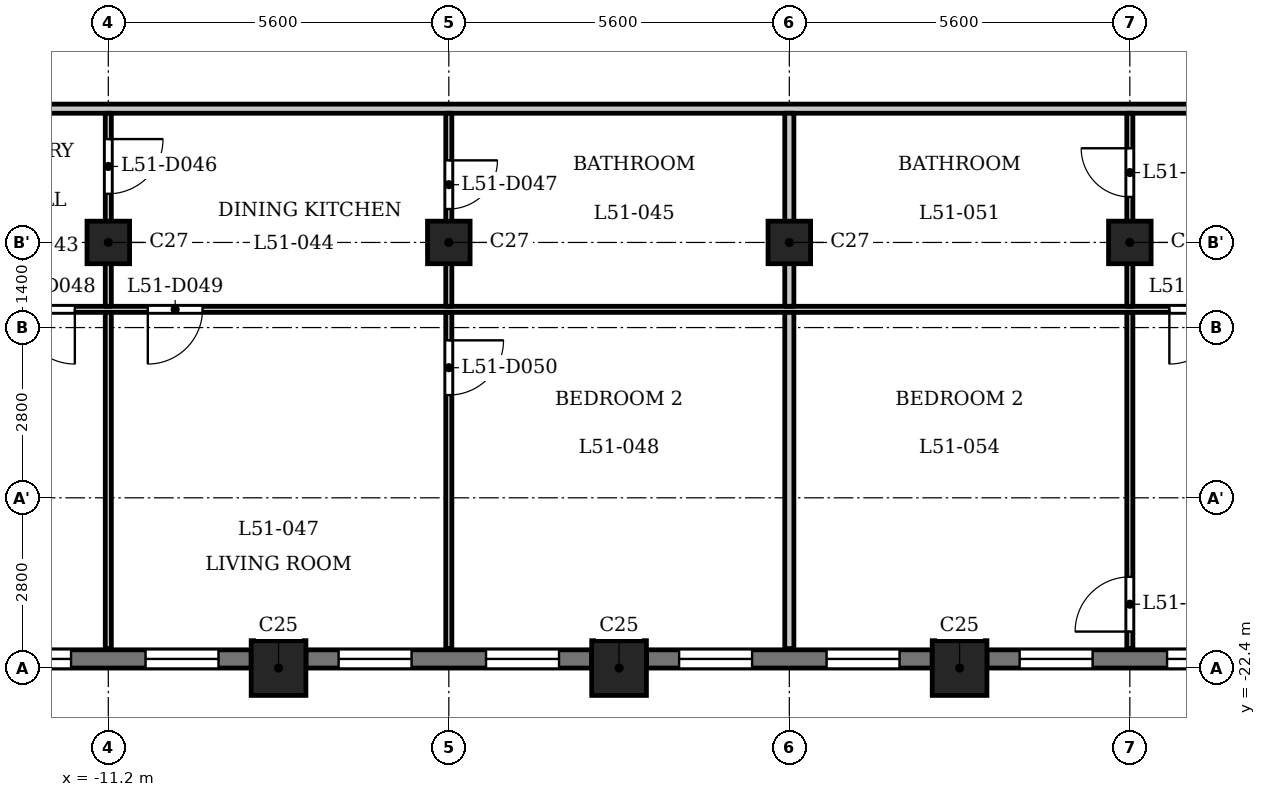
"""IFC4 building model, lengths in metres.
Left out: names, types, materials, properties, quantities, classifications, styles, units other than length and angle.
Written with IfcOpenShell. Run it as: python <this file> out.ifc"""

import sys

from ifc_helpers import new_model, si_unit, direction, frame, frame_2d, origin, origin_2d, place, context, subcontext, project, spatial, rectangle, extrude, element, fill, save


model = new_model("IFC4")
c1 = context("Model", 3, precision=1e-05, world=origin(), true_north=direction((0.0, 1.0)))
c2 = subcontext(c1, "Body", "Model", "MODEL_VIEW")
j1 = project(units=[si_unit("LENGTHUNIT", "METRE"), si_unit("PLANEANGLEUNIT", "RADIAN")], contexts=[c1])
p1 = place(None, origin())
s1 = spatial("IfcSite", under=j1, at=p1, CompositionType="ELEMENT")
p2 = place(p1, origin())
s2 = spatial("IfcBuilding", under=s1, at=p2, CompositionType="ELEMENT")
p3 = place(p2, frame((0.0, 0.0, 199.4)))
s3 = spatial("IfcBuildingStorey", under=s2, at=p3, CompositionType="ELEMENT", Elevation=199.4)
for number, where, z_axis, x_axis in (
    (1, (-8.4, -22.4, 0.0), (0.0, 0.0, 1.0), (1.0, 0.0, 0.0)),
    (2, (-2.8, -22.4, 0.0), (0.0, 0.0, 1.0), (1.0, 0.0, 0.0)),
    (3, (2.8, -22.4, 0.0), (0.0, 0.0, 1.0), (1.0, 0.0, 0.0)),
):
    element("IfcColumn", number, at=place(p3, frame(where, z_axis=z_axis, x_axis=x_axis)), inside=s3, PredefinedType="COLUMN", context=c2, shape_type="SweptSolid", body=[
        extrude(rectangle(XDim=0.9, YDim=0.9, at=origin_2d()), origin(), (0.0, 0.0, 1.0), 3.5),
    ])
for number, where, z_axis, x_axis in (
    (4, (-11.2, -15.4, 0.0), (0.0, 0.0, 1.0), (1.0, 0.0, 0.0)),
    (5, (-5.6, -15.4, 0.0), (0.0, 0.0, 1.0), (1.0, 0.0, 0.0)),
    (6, (0.0, -15.4, 0.0), (0.0, 0.0, 1.0), (1.0, 0.0, 0.0)),
    (7, (5.6, -15.4, 0.0), (0.0, 0.0, 1.0), (1.0, 0.0, 0.0)),
):
    element("IfcColumn", number, at=place(p3, frame(where, z_axis=z_axis, x_axis=x_axis)), inside=s3, PredefinedType="COLUMN", context=c2, shape_type="SweptSolid", body=[
        extrude(rectangle(XDim=0.7, YDim=0.7, at=origin_2d()), origin(), (0.0, 0.0, 1.0), 3.5),
    ])
p4 = place(p3, frame((-13.55, -22.25, 0.0), z_axis=(0.0, 0.0, 1.0), x_axis=(1.0, 0.0, 0.0)))
e8 = element("IfcWall", 8, at=p4, inside=s3, PredefinedType="SOLIDWALL", context=c2, shape_type="SweptSolid", body=[
    extrude(rectangle(XDim=4.7, YDim=0.3, at=frame_2d((2.35, 0.0))), origin(), (0.0, 0.0, 1.0), 2.5),
])
p5 = place(p4, frame((0.538, 0.0, 0.6)))
e9 = element("IfcOpeningElement", 9, at=p5, cuts=e8, PredefinedType="OPENING", context=c2, shape_type="SweptSolid", body=[
    extrude(rectangle(XDim=1.2, YDim=1.55, at=frame_2d((0.6, 0.775))), frame((0.0, 0.16, 0.0), z_axis=(0.0, -1.0, 0.0), x_axis=(1.0, 0.0, 0.0)), (0.0, 0.0, 1.0), 0.32),
])
p6 = place(p4, frame((2.962, 0.0, 0.6)))
e10 = element("IfcOpeningElement", 10, at=p6, cuts=e8, PredefinedType="OPENING", context=c2, shape_type="SweptSolid", body=[
    extrude(rectangle(XDim=1.2, YDim=1.55, at=frame_2d((0.6, 0.775))), frame((0.0, 0.16, 0.0), z_axis=(0.0, -1.0, 0.0), x_axis=(1.0, 0.0, 0.0)), (0.0, 0.0, 1.0), 0.32),
])
p7 = place(p3, frame((-7.95, -22.25, 0.0), z_axis=(0.0, 0.0, 1.0), x_axis=(1.0, 0.0, 0.0)))
e11 = element("IfcWall", 11, at=p7, inside=s3, PredefinedType="SOLIDWALL", context=c2, shape_type="SweptSolid", body=[
    extrude(rectangle(XDim=4.7, YDim=0.3, at=frame_2d((2.35, 0.0))), origin(), (0.0, 0.0, 1.0), 2.5),
])
p8 = place(p7, frame((0.538, 0.0, 0.6)))
e12 = element("IfcOpeningElement", 12, at=p8, cuts=e11, PredefinedType="OPENING", context=c2, shape_type="SweptSolid", body=[
    extrude(rectangle(XDim=1.2, YDim=1.55, at=frame_2d((0.6, 0.775))), frame((0.0, 0.16, 0.0), z_axis=(0.0, -1.0, 0.0), x_axis=(1.0, 0.0, 0.0)), (0.0, 0.0, 1.0), 0.32),
])
p9 = place(p7, frame((2.962, 0.0, 0.6)))
e13 = element("IfcOpeningElement", 13, at=p9, cuts=e11, PredefinedType="OPENING", context=c2, shape_type="SweptSolid", body=[
    extrude(rectangle(XDim=1.2, YDim=1.55, at=frame_2d((0.6, 0.775))), frame((0.0, 0.16, 0.0), z_axis=(0.0, -1.0, 0.0), x_axis=(1.0, 0.0, 0.0)), (0.0, 0.0, 1.0), 0.32),
])
p10 = place(p3, frame((-2.35, -22.25, 0.0), z_axis=(0.0, 0.0, 1.0), x_axis=(1.0, 0.0, 0.0)))
e14 = element("IfcWall", 14, at=p10, inside=s3, PredefinedType="SOLIDWALL", context=c2, shape_type="SweptSolid", body=[
    extrude(rectangle(XDim=4.7, YDim=0.3, at=frame_2d((2.35, 0.0))), origin(), (0.0, 0.0, 1.0), 2.5),
])
p11 = place(p10, frame((0.538, 0.0, 0.6)))
e15 = element("IfcOpeningElement", 15, at=p11, cuts=e14, PredefinedType="OPENING", context=c2, shape_type="SweptSolid", body=[
    extrude(rectangle(XDim=1.2, YDim=1.55, at=frame_2d((0.6, 0.775))), frame((0.0, 0.16, 0.0), z_axis=(0.0, -1.0, 0.0), x_axis=(1.0, 0.0, 0.0)), (0.0, 0.0, 1.0), 0.32),
])
p12 = place(p10, frame((2.962, 0.0, 0.6)))
e16 = element("IfcOpeningElement", 16, at=p12, cuts=e14, PredefinedType="OPENING", context=c2, shape_type="SweptSolid", body=[
    extrude(rectangle(XDim=1.2, YDim=1.55, at=frame_2d((0.6, 0.775))), frame((0.0, 0.16, 0.0), z_axis=(0.0, -1.0, 0.0), x_axis=(1.0, 0.0, 0.0)), (0.0, 0.0, 1.0), 0.32),
])
p13 = place(p3, frame((3.25, -22.25, 0.0), z_axis=(0.0, 0.0, 1.0), x_axis=(1.0, 0.0, 0.0)))
e17 = element("IfcWall", 17, at=p13, inside=s3, PredefinedType="SOLIDWALL", context=c2, shape_type="SweptSolid", body=[
    extrude(rectangle(XDim=4.7, YDim=0.3, at=frame_2d((2.35, 0.0))), origin(), (0.0, 0.0, 1.0), 2.5),
])
p14 = place(p13, frame((0.538, 0.0, 0.6)))
e18 = element("IfcOpeningElement", 18, at=p14, cuts=e17, PredefinedType="OPENING", context=c2, shape_type="SweptSolid", body=[
    extrude(rectangle(XDim=1.2, YDim=1.55, at=frame_2d((0.6, 0.775))), frame((0.0, 0.16, 0.0), z_axis=(0.0, -1.0, 0.0), x_axis=(1.0, 0.0, 0.0)), (0.0, 0.0, 1.0), 0.32),
])
p15 = place(p13, frame((2.962, 0.0, 0.6)))
e19 = element("IfcOpeningElement", 19, at=p15, cuts=e17, PredefinedType="OPENING", context=c2, shape_type="SweptSolid", body=[
    extrude(rectangle(XDim=1.2, YDim=1.55, at=frame_2d((0.6, 0.775))), frame((0.0, 0.16, 0.0), z_axis=(0.0, -1.0, 0.0), x_axis=(1.0, 0.0, 0.0)), (0.0, 0.0, 1.0), 0.32),
])
p16 = place(p3, frame((-16.725, -16.5, 0.0), z_axis=(0.0, 0.0, 1.0), x_axis=(1.0, 0.0, 0.0)))
e20 = element("IfcWall", 20, at=p16, inside=s3, PredefinedType="PARTITIONING", context=c2, shape_type="SweptSolid", body=[
    extrude(rectangle(XDim=33.45, YDim=0.1, at=frame_2d((16.725, 0.0))), origin(), (0.0, 0.0, 1.0), 3.2),
])
p17 = place(p16, frame((4.075, 0.0, 0.0)))
e21 = element("IfcOpeningElement", 21, at=p17, cuts=e20, PredefinedType="OPENING", context=c2, shape_type="SweptSolid", body=[
    extrude(rectangle(XDim=0.9, YDim=2.1, at=frame_2d((0.45, 1.05))), frame((0.0, 0.06, 0.0), z_axis=(0.0, -1.0, 0.0), x_axis=(1.0, 0.0, 0.0)), (0.0, 0.0, 1.0), 0.12),
])
p18 = place(p16, frame((6.175, 0.0, 0.0)))
e22 = element("IfcOpeningElement", 22, at=p18, cuts=e20, PredefinedType="OPENING", context=c2, shape_type="SweptSolid", body=[
    extrude(rectangle(XDim=0.9, YDim=2.1, at=frame_2d((0.45, 1.05))), frame((0.0, 0.06, 0.0), z_axis=(0.0, -1.0, 0.0), x_axis=(1.0, 0.0, 0.0)), (0.0, 0.0, 1.0), 0.12),
])
p19 = place(p16, frame((30.575, 0.0, 0.0)))
e23 = element("IfcOpeningElement", 23, at=p19, cuts=e20, PredefinedType="OPENING", context=c2, shape_type="SweptSolid", body=[
    extrude(rectangle(XDim=0.9, YDim=2.1, at=frame_2d((0.45, 1.05))), frame((0.0, 0.06, 0.0), z_axis=(0.0, -1.0, 0.0), x_axis=(1.0, 0.0, 0.0)), (0.0, 0.0, 1.0), 0.12),
])
p20 = place(p16, frame((22.975, 0.0, 0.0)))
e24 = element("IfcOpeningElement", 24, at=p20, cuts=e20, PredefinedType="OPENING", context=c2, shape_type="SweptSolid", body=[
    extrude(rectangle(XDim=0.9, YDim=2.1, at=frame_2d((0.45, 1.05))), frame((0.0, 0.06, 0.0), z_axis=(0.0, -1.0, 0.0), x_axis=(1.0, 0.0, 0.0)), (0.0, 0.0, 1.0), 0.12),
])
p21 = place(p3, frame((-17.4, -13.2, 0.0), z_axis=(0.0, 0.0, 1.0), x_axis=(1.0, 0.0, 0.0)))
e25 = element("IfcWall", 25, at=p21, inside=s3, PredefinedType="PARTITIONING", context=c2, shape_type="SweptSolid", body=[
    extrude(rectangle(XDim=34.8, YDim=0.15, at=frame_2d((17.4, 0.0))), origin(), (0.0, 0.0, 1.0), 3.2),
])
p22 = place(p21, frame((0.15, 0.0, 0.0)))
e26 = element("IfcOpeningElement", 26, at=p22, cuts=e25, PredefinedType="OPENING", context=c2, shape_type="SweptSolid", body=[
    extrude(rectangle(XDim=1.0, YDim=2.1, at=frame_2d((0.5, 1.05))), frame((0.0, 0.085, 0.0), z_axis=(0.0, -1.0, 0.0), x_axis=(1.0, 0.0, 0.0)), (0.0, 0.0, 1.0), 0.17),
])
p23 = place(p21, frame((33.55, 0.0, 0.0)))
e27 = element("IfcOpeningElement", 27, at=p23, cuts=e25, PredefinedType="OPENING", context=c2, shape_type="SweptSolid", body=[
    extrude(rectangle(XDim=1.0, YDim=2.1, at=frame_2d((0.5, 1.05))), frame((0.0, 0.085, 0.0), z_axis=(0.0, -1.0, 0.0), x_axis=(1.0, 0.0, 0.0)), (0.0, 0.0, 1.0), 0.17),
])
p24 = place(p3, frame((-11.2, -22.08, 0.0), z_axis=(0.0, 0.0, 1.0), x_axis=(0.0, 1.0, 0.0)))
e28 = element("IfcWall", 28, at=p24, inside=s3, PredefinedType="PARTITIONING", context=c2, shape_type="SweptSolid", body=[
    extrude(rectangle(XDim=5.53, YDim=0.1, at=frame_2d((2.765, 0.0))), origin(), (0.0, 0.0, 1.0), 3.2),
])
p25 = place(p3, frame((-11.2, -16.45, 0.0), z_axis=(0.0, 0.0, 1.0), x_axis=(0.0, 1.0, 0.0)))
e29 = element("IfcWall", 29, at=p25, inside=s3, PredefinedType="PARTITIONING", context=c2, shape_type="SweptSolid", body=[
    extrude(rectangle(XDim=3.175, YDim=0.1, at=frame_2d((1.587, 0.0))), origin(), (0.0, 0.0, 1.0), 3.2),
])
p26 = place(p25, frame((1.85, 0.0, 0.0)))
e30 = element("IfcOpeningElement", 30, at=p26, cuts=e29, PredefinedType="OPENING", context=c2, shape_type="SweptSolid", body=[
    extrude(rectangle(XDim=0.9, YDim=2.1, at=frame_2d((0.45, 1.05))), frame((0.0, 0.06, 0.0), z_axis=(0.0, -1.0, 0.0), x_axis=(1.0, 0.0, 0.0)), (0.0, 0.0, 1.0), 0.12),
])
p27 = place(p3, frame((-5.6, -22.08, 0.0), z_axis=(0.0, 0.0, 1.0), x_axis=(0.0, 1.0, 0.0)))
e31 = element("IfcWall", 31, at=p27, inside=s3, PredefinedType="PARTITIONING", context=c2, shape_type="SweptSolid", body=[
    extrude(rectangle(XDim=5.53, YDim=0.1, at=frame_2d((2.765, 0.0))), origin(), (0.0, 0.0, 1.0), 3.2),
])
p28 = place(p27, frame((4.17, 0.0, 0.0)))
e32 = element("IfcOpeningElement", 32, at=p28, cuts=e31, PredefinedType="OPENING", context=c2, shape_type="SweptSolid", body=[
    extrude(rectangle(XDim=0.9, YDim=2.1, at=frame_2d((0.45, 1.05))), frame((0.0, 0.06, 0.0), z_axis=(0.0, -1.0, 0.0), x_axis=(1.0, 0.0, 0.0)), (0.0, 0.0, 1.0), 0.12),
])
p29 = place(p3, frame((-5.6, -16.45, 0.0), z_axis=(0.0, 0.0, 1.0), x_axis=(0.0, 1.0, 0.0)))
e33 = element("IfcWall", 33, at=p29, inside=s3, PredefinedType="PARTITIONING", context=c2, shape_type="SweptSolid", body=[
    extrude(rectangle(XDim=3.175, YDim=0.1, at=frame_2d((1.587, 0.0))), origin(), (0.0, 0.0, 1.0), 3.2),
])
p30 = place(p29, frame((1.6, 0.0, 0.0)))
e34 = element("IfcOpeningElement", 34, at=p30, cuts=e33, PredefinedType="OPENING", context=c2, shape_type="SweptSolid", body=[
    extrude(rectangle(XDim=0.8, YDim=2.1, at=frame_2d((0.4, 1.05))), frame((0.0, 0.06, 0.0), z_axis=(0.0, -1.0, 0.0), x_axis=(1.0, 0.0, 0.0)), (0.0, 0.0, 1.0), 0.12),
])
p31 = place(p3, frame((0.0, -22.08, 0.0), z_axis=(0.0, 0.0, 1.0), x_axis=(0.0, 1.0, 0.0)))
e35 = element("IfcWall", 35, at=p31, inside=s3, PredefinedType="PARTITIONING", context=c2, shape_type="SweptSolid", body=[
    extrude(rectangle(XDim=5.53, YDim=0.15, at=frame_2d((2.765, 0.0))), origin(), (0.0, 0.0, 1.0), 3.2),
])
p32 = place(p3, frame((0.0, -16.45, 0.0), z_axis=(0.0, 0.0, 1.0), x_axis=(0.0, 1.0, 0.0)))
e36 = element("IfcWall", 36, at=p32, inside=s3, PredefinedType="PARTITIONING", context=c2, shape_type="SweptSolid", body=[
    extrude(rectangle(XDim=3.175, YDim=0.15, at=frame_2d((1.587, 0.0))), origin(), (0.0, 0.0, 1.0), 3.2),
])
p33 = place(p3, frame((5.6, -22.08, 0.0), z_axis=(0.0, 0.0, 1.0), x_axis=(0.0, 1.0, 0.0)))
e37 = element("IfcWall", 37, at=p33, inside=s3, PredefinedType="PARTITIONING", context=c2, shape_type="SweptSolid", body=[
    extrude(rectangle(XDim=5.53, YDim=0.1, at=frame_2d((2.765, 0.0))), origin(), (0.0, 0.0, 1.0), 3.2),
])
p34 = place(p33, frame((0.28, 0.0, 0.0)))
e38 = element("IfcOpeningElement", 38, at=p34, cuts=e37, PredefinedType="OPENING", context=c2, shape_type="SweptSolid", body=[
    extrude(rectangle(XDim=0.9, YDim=2.1, at=frame_2d((0.45, 1.05))), frame((0.0, 0.06, 0.0), z_axis=(0.0, -1.0, 0.0), x_axis=(1.0, 0.0, 0.0)), (0.0, 0.0, 1.0), 0.12),
])
p35 = place(p3, frame((5.6, -16.45, 0.0), z_axis=(0.0, 0.0, 1.0), x_axis=(0.0, 1.0, 0.0)))
e39 = element("IfcWall", 39, at=p35, inside=s3, PredefinedType="PARTITIONING", context=c2, shape_type="SweptSolid", body=[
    extrude(rectangle(XDim=3.175, YDim=0.1, at=frame_2d((1.587, 0.0))), origin(), (0.0, 0.0, 1.0), 3.2),
])
p36 = place(p35, frame((1.799, 0.0, 0.0)))
e40 = element("IfcOpeningElement", 40, at=p36, cuts=e39, PredefinedType="OPENING", context=c2, shape_type="SweptSolid", body=[
    extrude(rectangle(XDim=0.8, YDim=2.1, at=frame_2d((0.4, 1.05))), frame((0.0, 0.06, 0.0), z_axis=(0.0, -1.0, 0.0), x_axis=(1.0, 0.0, 0.0)), (0.0, 0.0, 1.0), 0.12),
])
p37 = place(p26, origin())
e41 = element("IfcDoor", 41, at=p37, inside=s3, OperationType="SINGLE_SWING_RIGHT", PredefinedType="DOOR", context=c2, shape_type="SweptSolid", body=[
    extrude(rectangle(XDim=0.9, YDim=2.1, at=frame_2d((0.45, 1.05))), frame((0.0, 0.025, 0.0), z_axis=(0.0, -1.0, 0.0), x_axis=(1.0, 0.0, 0.0)), (0.0, 0.0, 1.0), 0.05),
])
fill(e30, e41)
p38 = place(p30, origin())
e42 = element("IfcDoor", 42, at=p38, inside=s3, OperationType="SINGLE_SWING_RIGHT", PredefinedType="DOOR", context=c2, shape_type="SweptSolid", body=[
    extrude(rectangle(XDim=0.8, YDim=2.1, at=frame_2d((0.4, 1.05))), frame((0.0, 0.025, 0.0), z_axis=(0.0, -1.0, 0.0), x_axis=(1.0, 0.0, 0.0)), (0.0, 0.0, 1.0), 0.05),
])
fill(e34, e42)
p39 = place(p17, origin())
e43 = element("IfcDoor", 43, at=p39, inside=s3, OperationType="SINGLE_SWING_RIGHT", PredefinedType="DOOR", context=c2, shape_type="SweptSolid", body=[
    extrude(rectangle(XDim=0.9, YDim=2.1, at=frame_2d((0.45, 1.05))), frame((0.0, 0.025, 0.0), z_axis=(0.0, -1.0, 0.0), x_axis=(1.0, 0.0, 0.0)), (0.0, 0.0, 1.0), 0.05),
])
fill(e21, e43)
p40 = place(p18, origin())
e44 = element("IfcDoor", 44, at=p40, inside=s3, OperationType="SINGLE_SWING_LEFT", PredefinedType="DOOR", context=c2, shape_type="SweptSolid", body=[
    extrude(rectangle(XDim=0.9, YDim=2.1, at=frame_2d((0.45, 1.05))), frame((0.0, 0.025, 0.0), z_axis=(0.0, -1.0, 0.0), x_axis=(1.0, 0.0, 0.0)), (0.0, 0.0, 1.0), 0.05),
])
fill(e22, e44)
p41 = place(p28, origin())
e45 = element("IfcDoor", 45, at=p41, inside=s3, OperationType="SINGLE_SWING_RIGHT", PredefinedType="DOOR", context=c2, shape_type="SweptSolid", body=[
    extrude(rectangle(XDim=0.9, YDim=2.1, at=frame_2d((0.45, 1.05))), frame((0.0, 0.025, 0.0), z_axis=(0.0, -1.0, 0.0), x_axis=(1.0, 0.0, 0.0)), (0.0, 0.0, 1.0), 0.05),
])
fill(e32, e45)
p42 = place(p36, origin())
e46 = element("IfcDoor", 46, at=p42, inside=s3, OperationType="SINGLE_SWING_LEFT", PredefinedType="DOOR", context=c2, shape_type="SweptSolid", body=[
    extrude(rectangle(XDim=0.8, YDim=2.1, at=frame_2d((0.4, 1.05))), frame((0.0, 0.025, 0.0), z_axis=(0.0, -1.0, 0.0), x_axis=(1.0, 0.0, 0.0)), (0.0, 0.0, 1.0), 0.05),
])
fill(e40, e46)
p43 = place(p20, origin())
e47 = element("IfcDoor", 47, at=p43, inside=s3, OperationType="SINGLE_SWING_LEFT", PredefinedType="DOOR", context=c2, shape_type="SweptSolid", body=[
    extrude(rectangle(XDim=0.9, YDim=2.1, at=frame_2d((0.45, 1.05))), frame((0.0, 0.025, 0.0), z_axis=(0.0, -1.0, 0.0), x_axis=(1.0, 0.0, 0.0)), (0.0, 0.0, 1.0), 0.05),
])
fill(e24, e47)
p44 = place(p34, origin())
e48 = element("IfcDoor", 48, at=p44, inside=s3, OperationType="SINGLE_SWING_RIGHT", PredefinedType="DOOR", context=c2, shape_type="SweptSolid", body=[
    extrude(rectangle(XDim=0.9, YDim=2.1, at=frame_2d((0.45, 1.05))), frame((0.0, 0.025, 0.0), z_axis=(0.0, -1.0, 0.0), x_axis=(1.0, 0.0, 0.0)), (0.0, 0.0, 1.0), 0.05),
])
fill(e38, e48)
p45 = place(p5, origin())
e49 = element("IfcWindow", 49, at=p45, inside=s3, PartitioningType="SINGLE_PANEL", PredefinedType="WINDOW", context=c2, shape_type="SweptSolid", body=[
    extrude(rectangle(XDim=1.2, YDim=1.55, at=frame_2d((0.6, 0.775))), frame((0.0, 0.03, 0.0), z_axis=(0.0, -1.0, 0.0), x_axis=(1.0, 0.0, 0.0)), (0.0, 0.0, 1.0), 0.06),
])
fill(e9, e49)
p46 = place(p6, origin())
e50 = element("IfcWindow", 50, at=p46, inside=s3, PartitioningType="SINGLE_PANEL", PredefinedType="WINDOW", context=c2, shape_type="SweptSolid", body=[
    extrude(rectangle(XDim=1.2, YDim=1.55, at=frame_2d((0.6, 0.775))), frame((0.0, 0.03, 0.0), z_axis=(0.0, -1.0, 0.0), x_axis=(1.0, 0.0, 0.0)), (0.0, 0.0, 1.0), 0.06),
])
fill(e10, e50)
p47 = place(p8, origin())
e51 = element("IfcWindow", 51, at=p47, inside=s3, PartitioningType="SINGLE_PANEL", PredefinedType="WINDOW", context=c2, shape_type="SweptSolid", body=[
    extrude(rectangle(XDim=1.2, YDim=1.55, at=frame_2d((0.6, 0.775))), frame((0.0, 0.03, 0.0), z_axis=(0.0, -1.0, 0.0), x_axis=(1.0, 0.0, 0.0)), (0.0, 0.0, 1.0), 0.06),
])
fill(e12, e51)
p48 = place(p9, origin())
e52 = element("IfcWindow", 52, at=p48, inside=s3, PartitioningType="SINGLE_PANEL", PredefinedType="WINDOW", context=c2, shape_type="SweptSolid", body=[
    extrude(rectangle(XDim=1.2, YDim=1.55, at=frame_2d((0.6, 0.775))), frame((0.0, 0.03, 0.0), z_axis=(0.0, -1.0, 0.0), x_axis=(1.0, 0.0, 0.0)), (0.0, 0.0, 1.0), 0.06),
])
fill(e13, e52)
p49 = place(p11, origin())
e53 = element("IfcWindow", 53, at=p49, inside=s3, PartitioningType="SINGLE_PANEL", PredefinedType="WINDOW", context=c2, shape_type="SweptSolid", body=[
    extrude(rectangle(XDim=1.2, YDim=1.55, at=frame_2d((0.6, 0.775))), frame((0.0, 0.03, 0.0), z_axis=(0.0, -1.0, 0.0), x_axis=(1.0, 0.0, 0.0)), (0.0, 0.0, 1.0), 0.06),
])
fill(e15, e53)
p50 = place(p12, origin())
e54 = element("IfcWindow", 54, at=p50, inside=s3, PartitioningType="SINGLE_PANEL", PredefinedType="WINDOW", context=c2, shape_type="SweptSolid", body=[
    extrude(rectangle(XDim=1.2, YDim=1.55, at=frame_2d((0.6, 0.775))), frame((0.0, 0.03, 0.0), z_axis=(0.0, -1.0, 0.0), x_axis=(1.0, 0.0, 0.0)), (0.0, 0.0, 1.0), 0.06),
])
fill(e16, e54)
p51 = place(p14, origin())
e55 = element("IfcWindow", 55, at=p51, inside=s3, PartitioningType="SINGLE_PANEL", PredefinedType="WINDOW", context=c2, shape_type="SweptSolid", body=[
    extrude(rectangle(XDim=1.2, YDim=1.55, at=frame_2d((0.6, 0.775))), frame((0.0, 0.03, 0.0), z_axis=(0.0, -1.0, 0.0), x_axis=(1.0, 0.0, 0.0)), (0.0, 0.0, 1.0), 0.06),
])
fill(e18, e55)
p52 = place(p15, origin())
e56 = element("IfcWindow", 56, at=p52, inside=s3, PartitioningType="SINGLE_PANEL", PredefinedType="WINDOW", context=c2, shape_type="SweptSolid", body=[
    extrude(rectangle(XDim=1.2, YDim=1.55, at=frame_2d((0.6, 0.775))), frame((0.0, 0.03, 0.0), z_axis=(0.0, -1.0, 0.0), x_axis=(1.0, 0.0, 0.0)), (0.0, 0.0, 1.0), 0.06),
])
fill(e19, e56)
save(model, sys.argv[1])
